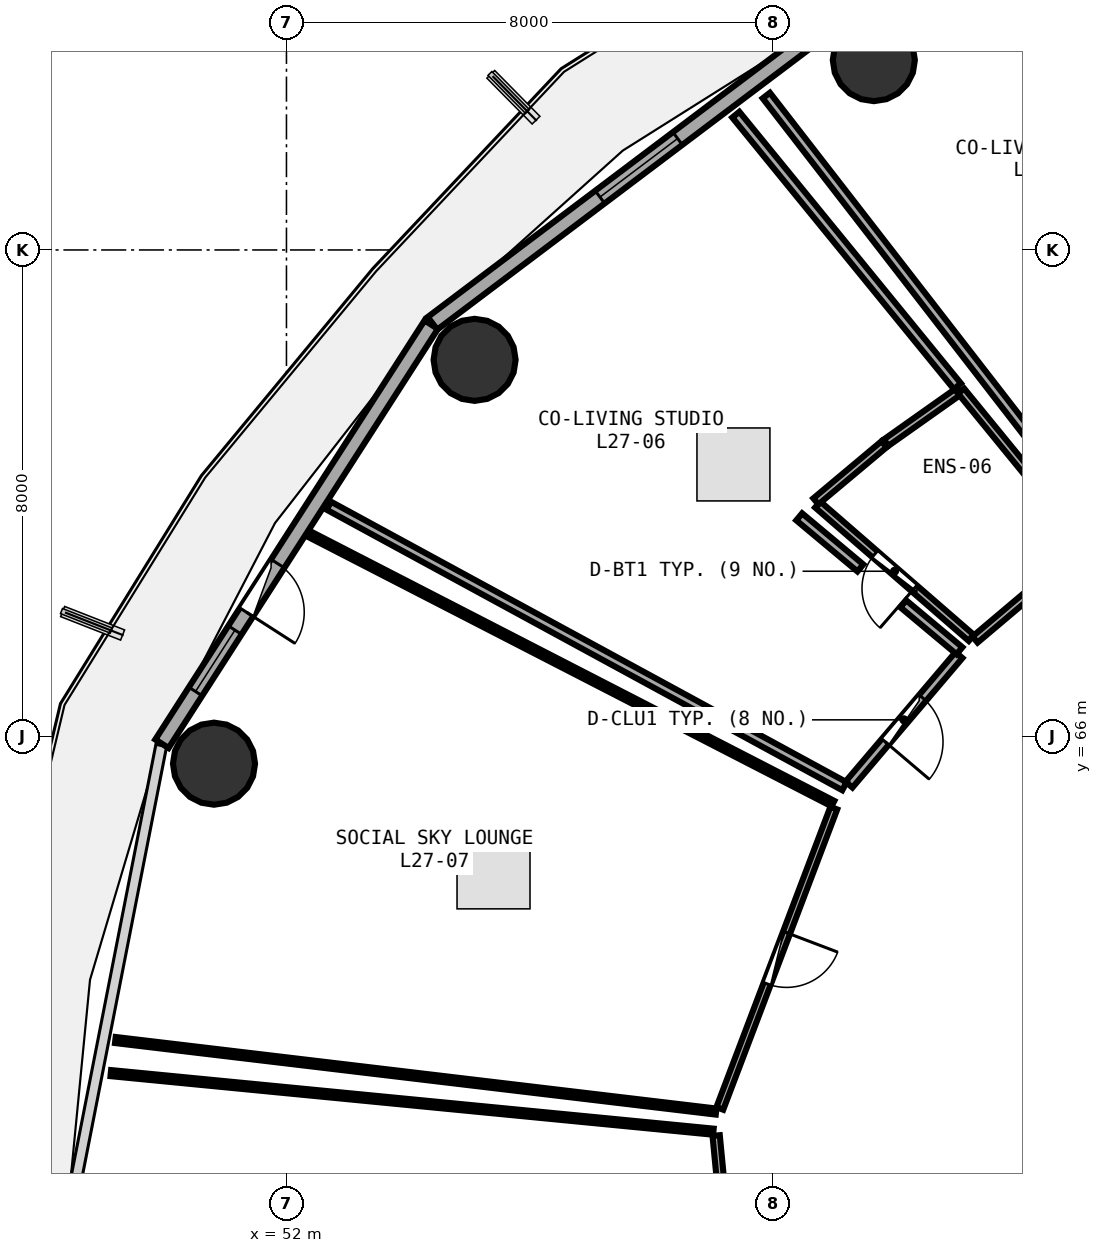
"""IFC4 building model, lengths in metres.
Left out: names, types, materials, properties, quantities, classifications, styles, units other than length and angle.
Written with IfcOpenShell. Run it as: python <this file> out.ifc"""

import sys

from ifc_helpers import new_model, si_unit, direction, frame, frame_2d, origin, origin_2d, place, context, subcontext, project, spatial, rectangle, circle, extrude, element, fill, save


model = new_model("IFC4")
c1 = context("Model", 3, precision=1e-05, world=origin(), true_north=direction((0.0, 1.0)))
c2 = subcontext(c1, "Body", "Model", "MODEL_VIEW")
j1 = project(units=[si_unit("LENGTHUNIT", "METRE"), si_unit("PLANEANGLEUNIT", "RADIAN")], contexts=[c1])
p1 = place(None, origin())
s1 = spatial("IfcSite", under=j1, at=p1, CompositionType="ELEMENT")
p2 = place(p1, origin())
s2 = spatial("IfcBuilding", under=s1, at=p2, CompositionType="ELEMENT")
p3 = place(p2, frame((0.0, 0.0, 106.35)))
s3 = spatial("IfcBuildingStorey", under=s2, at=p3, CompositionType="ELEMENT", Elevation=106.35)
for number, where, z_axis, x_axis in (
    (1, (61.66, 77.122, 0.0), (0.0, 0.0, 1.0), (1.0, 0.0, 0.0)),
    (2, (55.094, 72.193, 0.0), (0.0, 0.0, 1.0), (1.0, 0.0, 0.0)),
    (3, (50.808, 65.552, 0.0), (0.0, 0.0, 1.0), (1.0, 0.0, 0.0)),
):
    element("IfcColumn", number, at=place(p3, frame(where, z_axis=z_axis, x_axis=x_axis)), inside=s3, PredefinedType="COLUMN", context=c2, shape_type="SweptSolid", body=[
        extrude(circle(Radius=0.675, at=origin_2d()), origin(), (0.0, 0.0, 1.0), 3.75),
    ])
p4 = place(p3, frame((61.188, 77.91, 0.0), z_axis=(0.0, 0.0, 1.0), x_axis=(-0.798501507879, -0.601992808857, 0.0)))
e4 = element("IfcWall", 4, at=p4, inside=s3, PredefinedType="SOLIDWALL", context=c2, shape_type="SweptSolid", body=[
    extrude(rectangle(XDim=8.499, YDim=0.26, at=frame_2d((4.25, 0.0))), origin(), (0.0, 0.0, 1.0), 3.475),
])
p5 = place(p4, frame((3.45, 0.0, 0.85)))
e5 = element("IfcOpeningElement", 5, at=p5, cuts=e4, PredefinedType="OPENING", context=c2, shape_type="SweptSolid", body=[
    extrude(rectangle(XDim=1.6, YDim=1.45, at=frame_2d((0.8, 0.725))), frame((0.0, 0.14, 0.0), z_axis=(0.0, -1.0, 0.0), x_axis=(1.0, 0.0, 0.0)), (0.0, 0.0, 1.0), 0.28),
])
p6 = place(p3, frame((54.381, 72.771, 0.0), z_axis=(0.0, 0.0, 1.0), x_axis=(-0.540620528459, -0.841266571432, 0.0)))
e6 = element("IfcWall", 6, at=p6, inside=s3, PredefinedType="SOLIDWALL", context=c2, shape_type="SweptSolid", body=[
    extrude(rectangle(XDim=8.193, YDim=0.26, at=frame_2d((4.096, 0.0))), origin(), (0.0, 0.0, 1.0), 3.475),
])
p7 = place(p6, frame((4.671, 0.0, 0.0)))
e7 = element("IfcOpeningElement", 7, at=p7, cuts=e6, PredefinedType="OPENING", context=c2, shape_type="SweptSolid", body=[
    extrude(rectangle(XDim=0.95, YDim=2.1, at=frame_2d((0.475, 1.05))), frame((0.0, 0.14, 0.0), z_axis=(0.0, -1.0, 0.0), x_axis=(1.0, 0.0, 0.0)), (0.0, 0.0, 1.0), 0.28),
])
p8 = place(p6, frame((5.971, 0.0, 0.85)))
e8 = element("IfcOpeningElement", 8, at=p8, cuts=e6, PredefinedType="OPENING", context=c2, shape_type="SweptSolid", body=[
    extrude(rectangle(XDim=1.2, YDim=1.45, at=frame_2d((0.6, 0.725))), frame((0.0, 0.14, 0.0), z_axis=(0.0, -1.0, 0.0), x_axis=(1.0, 0.0, 0.0)), (0.0, 0.0, 1.0), 0.28),
])
p9 = place(p3, frame((63.264, 67.619, 0.0), z_axis=(0.0, 0.0, 1.0), x_axis=(-0.75497608509, 0.65575232439, 0.0)))
e9 = element("IfcWall", 9, at=p9, inside=s3, PredefinedType="PLUMBINGWALL", context=c2, shape_type="SweptSolid", body=[
    extrude(rectangle(XDim=3.346, YDim=0.13, at=frame_2d((1.673, 0.0))), origin(), (0.0, 0.0, 1.0), 3.235),
])
p10 = place(p9, frame((1.243, 0.0, 0.0)))
e10 = element("IfcOpeningElement", 10, at=p10, cuts=e9, PredefinedType="OPENING", context=c2, shape_type="SweptSolid", body=[
    extrude(rectangle(XDim=0.86, YDim=2.05, at=frame_2d((0.43, 1.025))), frame((0.0, 0.075, 0.0), z_axis=(0.0, -1.0, 0.0), x_axis=(1.0, 0.0, 0.0)), (0.0, 0.0, 1.0), 0.15),
])
p11 = place(p3, frame((63.06, 67.337, 0.0), z_axis=(0.0, 0.0, 1.0), x_axis=(-0.647519081114, -0.762049236988, 0.0)))
e11 = element("IfcWall", 11, at=p11, inside=s3, PredefinedType="PARTITIONING", context=c2, shape_type="SweptSolid", body=[
    extrude(rectangle(XDim=2.795, YDim=0.15, at=frame_2d((1.397, 0.0))), origin(), (0.0, 0.0, 1.0), 2.925),
])
p12 = place(p11, frame((0.922, 0.0, 0.0)))
e12 = element("IfcOpeningElement", 12, at=p12, cuts=e11, PredefinedType="OPENING", context=c2, shape_type="SweptSolid", body=[
    extrude(rectangle(XDim=0.95, YDim=2.08, at=frame_2d((0.475, 1.04))), frame((0.0, 0.085, 0.0), z_axis=(0.0, -1.0, 0.0), x_axis=(1.0, 0.0, 0.0)), (0.0, 0.0, 1.0), 0.17),
])
p13 = place(p3, frame((61.002, 64.821, 0.0), z_axis=(0.0, 0.0, 1.0), x_axis=(-0.354853458438, -0.934921934193, 0.0)))
e13 = element("IfcWall", 13, at=p13, inside=s3, PredefinedType="PARTITIONING", context=c2, shape_type="SweptSolid", body=[
    extrude(rectangle(XDim=5.282, YDim=0.12, at=frame_2d((2.641, 0.0))), origin(), (0.0, 0.0, 1.0), 3.235),
])
p14 = place(p13, frame((2.191, 0.0, 0.0)))
e14 = element("IfcOpeningElement", 14, at=p14, cuts=e13, PredefinedType="OPENING", context=c2, shape_type="SweptSolid", body=[
    extrude(rectangle(XDim=0.9, YDim=2.08, at=frame_2d((0.45, 1.04))), frame((0.0, 0.07, 0.0), z_axis=(0.0, -1.0, 0.0), x_axis=(1.0, 0.0, 0.0)), (0.0, 0.0, 1.0), 0.14),
])
p15 = place(p3, frame((59.067, 59.436, 0.0), z_axis=(0.0, 0.0, 1.0), x_axis=(0.095913591475, -0.995389663886, 0.0)))
e15 = element("IfcWall", 15, at=p15, inside=s3, PredefinedType="PARTITIONING", context=c2, shape_type="SweptSolid", body=[
    extrude(rectangle(XDim=5.226, YDim=0.12, at=frame_2d((2.613, 0.0))), origin(), (0.0, 0.0, 1.0), 2.925),
])
p16 = place(p15, frame((2.163, 0.0, 0.0)))
e16 = element("IfcOpeningElement", 16, at=p16, cuts=e15, PredefinedType="OPENING", context=c2, shape_type="SweptSolid", body=[
    extrude(rectangle(XDim=0.9, YDim=2.08, at=frame_2d((0.45, 1.04))), frame((0.0, 0.07, 0.0), z_axis=(0.0, -1.0, 0.0), x_axis=(1.0, 0.0, 0.0)), (0.0, 0.0, 1.0), 0.14),
])
p17 = place(p3, frame((65.506, 69.292, 0.0), z_axis=(0.0, 0.0, 1.0), x_axis=(-0.612364923916, 0.790575233585, 0.0)))
e17 = element("IfcWall", 17, at=p17, inside=s3, PredefinedType="PARTITIONING", context=c2, shape_type="SweptSolid", body=[
    extrude(rectangle(XDim=9.168, YDim=0.15, at=frame_2d((4.584, 0.0))), origin(), (0.0, 0.0, 1.0), 2.925),
])
p18 = place(p3, frame((64.219, 68.348, 0.0), z_axis=(0.0, 0.0, 1.0), x_axis=(-0.764137277769, -0.645053657244, 0.0)))
e18 = element("IfcWall", 18, at=p18, inside=s3, PredefinedType="PLUMBINGWALL", context=c2, shape_type="SweptSolid", body=[
    extrude(rectangle(XDim=1.171, YDim=0.13, at=frame_2d((0.585, 0.0))), origin(), (0.0, 0.0, 1.0), 3.48),
])
p19 = place(p3, frame((60.707, 69.866, 0.0), z_axis=(0.0, 0.0, 1.0), x_axis=(0.766482767596, 0.642264872913, 0.0)))
e19 = element("IfcWall", 19, at=p19, inside=s3, PredefinedType="PLUMBINGWALL", context=c2, shape_type="SweptSolid", body=[
    extrude(rectangle(XDim=1.464, YDim=0.13, at=frame_2d((0.732, 0.0))), origin(), (0.0, 0.0, 1.0), 3.48),
])
p20 = place(p3, frame((61.861, 70.831, 0.0), z_axis=(0.0, 0.0, 1.0), x_axis=(0.816339578676, 0.577572239886, 0.0)))
e20 = element("IfcWall", 20, at=p20, inside=s3, PredefinedType="PLUMBINGWALL", context=c2, shape_type="SweptSolid", body=[
    extrude(rectangle(XDim=1.477, YDim=0.13, at=frame_2d((0.738, 0.0))), origin(), (0.0, 0.0, 1.0), 3.48),
])
p21 = place(p3, frame((63.096, 71.679, 0.0), z_axis=(0.0, 0.0, 1.0), x_axis=(0.632781461548, -0.774330434583, 0.0)))
e21 = element("IfcWall", 21, at=p21, inside=s3, PredefinedType="PLUMBINGWALL", context=c2, shape_type="SweptSolid", body=[
    extrude(rectangle(XDim=3.351, YDim=0.13, at=frame_2d((1.676, 0.0))), origin(), (0.0, 0.0, 1.0), 2.925),
])
p22 = place(p3, frame((61.177, 65.181, 0.0), z_axis=(0.0, 0.0, 1.0), x_axis=(-0.878445909545, 0.477841798092, 0.0)))
e22 = element("IfcWall", 22, at=p22, inside=s3, PredefinedType="PARTITIONING", context=c2, shape_type="SweptSolid", body=[
    extrude(rectangle(XDim=9.653, YDim=0.15, at=frame_2d((4.827, 0.0))), origin(), (0.0, 0.0, 1.0), 2.925),
])
p23 = place(p3, frame((59.39, 76.225, 0.0), z_axis=(0.0, 0.0, 1.0), x_axis=(0.632139440809, -0.774854649192, 0.0)))
e23 = element("IfcWall", 23, at=p23, inside=s3, PredefinedType="PARTITIONING", context=c2, shape_type="SweptSolid", body=[
    extrude(rectangle(XDim=5.765, YDim=0.15, at=frame_2d((2.882, 0.0))), origin(), (0.0, 0.0, 1.0), 2.975),
])
p24 = place(p3, frame((60.433, 69.611, 0.0), z_axis=(0.0, 0.0, 1.0), x_axis=(0.767335111176, -0.641246307714, 0.0)))
e24 = element("IfcWall", 24, at=p24, inside=s3, PredefinedType="PARTITIONING", context=c2, shape_type="SweptSolid", body=[
    extrude(rectangle(XDim=1.311, YDim=0.15, at=frame_2d((0.655, 0.0))), origin(), (0.0, 0.0, 1.0), 3.48),
])
p25 = place(p3, frame((62.145, 68.181, 0.0), z_axis=(0.0, 0.0, 1.0), x_axis=(0.767356229846, -0.641221035616, 0.0)))
e25 = element("IfcWall", 25, at=p25, inside=s3, PredefinedType="PARTITIONING", context=c2, shape_type="SweptSolid", body=[
    extrude(rectangle(XDim=1.204, YDim=0.15, at=frame_2d((0.602, 0.0))), origin(), (0.0, 0.0, 1.0), 3.235),
])
p26 = place(p3, frame((59.066, 59.831, 0.0), z_axis=(0.0, 0.0, 1.0), x_axis=(-0.99298532521, 0.118237658624, 0.0)))
e26 = element("IfcWall", 26, at=p26, inside=s3, PredefinedType="PARTITIONING", context=c2, shape_type="SweptSolid", body=[
    extrude(rectangle(XDim=9.95, YDim=0.1, at=frame_2d((4.975, 0.0))), origin(), (0.0, 0.0, 1.0), 2.975),
])
p27 = place(p3, frame((52.382, 69.324, 0.0), z_axis=(0.0, 0.0, 1.0), x_axis=(0.889175506344, -0.457566300025, 0.0)))
e27 = element("IfcWall", 27, at=p27, inside=s3, PredefinedType="PARTITIONING", context=c2, shape_type="SweptSolid", body=[
    extrude(rectangle(XDim=9.678, YDim=0.1, at=frame_2d((4.839, 0.0))), origin(), (0.0, 0.0, 1.0), 2.925),
])
p28 = place(p3, frame((49.111, 60.463, 0.0), z_axis=(0.0, 0.0, 1.0), x_axis=(0.995310801703, -0.096728527399, 0.0)))
e28 = element("IfcWall", 28, at=p28, inside=s3, PredefinedType="PARTITIONING", context=c2, shape_type="SweptSolid", body=[
    extrude(rectangle(XDim=9.957, YDim=0.1, at=frame_2d((4.979, 0.0))), origin(), (0.0, 0.0, 1.0), 2.975),
])
p29 = place(p5, origin())
e29 = element("IfcWindow", 29, at=p29, inside=s3, PartitioningType="SINGLE_PANEL", PredefinedType="WINDOW", context=c2, shape_type="SweptSolid", body=[
    extrude(rectangle(XDim=1.6, YDim=1.45, at=frame_2d((0.8, 0.725))), frame((0.0, 0.03, 0.0), z_axis=(0.0, -1.0, 0.0), x_axis=(1.0, 0.0, 0.0)), (0.0, 0.0, 1.0), 0.06),
])
fill(e5, e29)
p30 = place(p7, frame((0.95, 0.0, 0.0), z_axis=(0.0, 0.0, 1.0), x_axis=(-1.0, 0.0, 0.0)))
e30 = element("IfcDoor", 30, at=p30, inside=s3, OperationType="SINGLE_SWING_LEFT", PredefinedType="DOOR", context=c2, shape_type="SweptSolid", body=[
    extrude(rectangle(XDim=0.95, YDim=2.1, at=frame_2d((0.475, 1.05))), frame((0.0, 0.025, 0.0), z_axis=(0.0, -1.0, 0.0), x_axis=(1.0, 0.0, 0.0)), (0.0, 0.0, 1.0), 0.05),
])
fill(e7, e30)
p31 = place(p8, origin())
e31 = element("IfcWindow", 31, at=p31, inside=s3, PartitioningType="SINGLE_PANEL", PredefinedType="WINDOW", context=c2, shape_type="SweptSolid", body=[
    extrude(rectangle(XDim=1.2, YDim=1.45, at=frame_2d((0.6, 0.725))), frame((0.0, 0.03, 0.0), z_axis=(0.0, -1.0, 0.0), x_axis=(1.0, 0.0, 0.0)), (0.0, 0.0, 1.0), 0.06),
])
fill(e8, e31)
p32 = place(p10, origin())
e32 = element("IfcDoor", 32, at=p32, inside=s3, OperationType="SINGLE_SWING_LEFT", PredefinedType="DOOR", context=c2, shape_type="SweptSolid", body=[
    extrude(rectangle(XDim=0.86, YDim=2.05, at=frame_2d((0.43, 1.025))), frame((0.0, 0.025, 0.0), z_axis=(0.0, -1.0, 0.0), x_axis=(1.0, 0.0, 0.0)), (0.0, 0.0, 1.0), 0.05),
])
fill(e10, e32)
p33 = place(p12, origin())
e33 = element("IfcDoor", 33, at=p33, inside=s3, OperationType="SINGLE_SWING_RIGHT", PredefinedType="DOOR", context=c2, shape_type="SweptSolid", body=[
    extrude(rectangle(XDim=0.95, YDim=2.08, at=frame_2d((0.475, 1.04))), frame((0.0, 0.025, 0.0), z_axis=(0.0, -1.0, 0.0), x_axis=(1.0, 0.0, 0.0)), (0.0, 0.0, 1.0), 0.05),
])
fill(e12, e33)
p34 = place(p14, origin())
e34 = element("IfcDoor", 34, at=p34, inside=s3, OperationType="SINGLE_SWING_LEFT", PredefinedType="DOOR", context=c2, shape_type="SweptSolid", body=[
    extrude(rectangle(XDim=0.9, YDim=2.08, at=frame_2d((0.45, 1.04))), frame((0.0, 0.025, 0.0), z_axis=(0.0, -1.0, 0.0), x_axis=(1.0, 0.0, 0.0)), (0.0, 0.0, 1.0), 0.05),
])
fill(e14, e34)
save(model, sys.argv[1])
